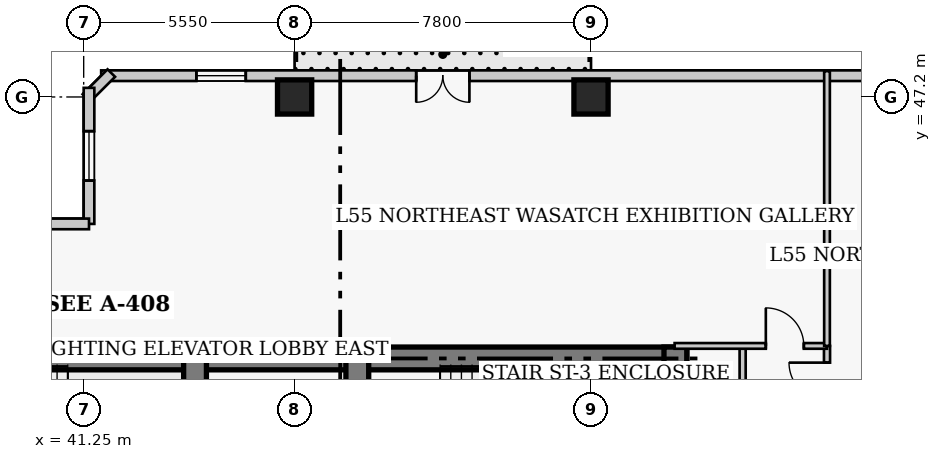
"""IFC4 building model, lengths in metres.
Left out: names, types, materials, properties, quantities, classifications, styles, units other than length and angle.
Written with IfcOpenShell. Run it as: python <this file> out.ifc"""

import sys

from ifc_helpers import new_model, si_unit, direction, frame, frame_2d, origin, origin_2d, place, context, subcontext, project, spatial, rectangle, extrude, element, fill, save


model = new_model("IFC4")
c1 = context("Model", 3, precision=1e-05, world=origin(), true_north=direction((0.0, 1.0)))
c2 = subcontext(c1, "Body", "Model", "MODEL_VIEW")
j1 = project(units=[si_unit("LENGTHUNIT", "METRE"), si_unit("PLANEANGLEUNIT", "RADIAN")], contexts=[c1])
p1 = place(None, origin())
s1 = spatial("IfcSite", under=j1, at=p1, CompositionType="ELEMENT")
p2 = place(p1, origin())
s2 = spatial("IfcBuilding", under=s1, at=p2, CompositionType="ELEMENT")
p3 = place(p2, frame((0.0, 0.0, 220.2)))
s3 = spatial("IfcBuildingStorey", under=s2, at=p3, CompositionType="ELEMENT", Elevation=220.2)
p4 = place(p3, frame((35.85, 40.32, 0.0), z_axis=(0.0, 0.0, 1.0), x_axis=(1.0, 0.0, 0.0)))
e1 = element("IfcWall", 1, at=p4, inside=s3, PredefinedType="SHEAR", context=c2, shape_type="SweptSolid", body=[
    extrude(rectangle(XDim=12.6, YDim=0.6, at=frame_2d((6.3, 0.0))), origin(), (0.0, 0.0, 1.0), 3.9),
])
p5 = place(p3, frame((48.45, 40.32, 0.0), z_axis=(0.0, 0.0, 1.0), x_axis=(1.0, 0.0, 0.0)))
e2 = element("IfcWall", 2, at=p5, inside=s3, PredefinedType="SHEAR", context=c2, shape_type="SweptSolid", body=[
    extrude(rectangle(XDim=8.67, YDim=0.6, at=frame_2d((4.335, 0.0))), origin(), (0.0, 0.0, 1.0), 3.9),
])
p6 = place(p3, frame((56.82, 27.05, 0.0), z_axis=(0.0, 0.0, 1.0), x_axis=(0.0, 1.0, 0.0)))
e3 = element("IfcWall", 3, at=p6, inside=s3, PredefinedType="SHEAR", context=c2, shape_type="SweptSolid", body=[
    extrude(rectangle(XDim=13.57, YDim=0.6, at=frame_2d((6.785, 0.0))), origin(), (0.0, 0.0, 1.0), 3.9),
])
p7 = place(p3, frame((44.18, 36.37, 0.0), z_axis=(0.0, 0.0, 1.0), x_axis=(0.0, 1.0, 0.0)))
e4 = element("IfcWall", 4, at=p7, inside=s3, PredefinedType="SHEAR", context=c2, shape_type="SweptSolid", body=[
    extrude(rectangle(XDim=3.95, YDim=0.6, at=frame_2d((1.975, 0.0))), origin(), (0.0, 0.0, 1.0), 3.9),
])
p8 = place(p3, frame((48.45, 32.45, 0.0), z_axis=(0.0, 0.0, 1.0), x_axis=(0.0, 1.0, 0.0)))
e5 = element("IfcWall", 5, at=p8, inside=s3, PredefinedType="SHEAR", context=c2, shape_type="SweptSolid", body=[
    extrude(rectangle(XDim=7.87, YDim=0.6, at=frame_2d((3.935, 0.0))), origin(), (0.0, 0.0, 1.0), 3.9),
])
p9 = place(p8, frame((5.75, 0.0, 0.0)))
e6 = element("IfcOpeningElement", 6, at=p9, cuts=e5, PredefinedType="OPENING", context=c2, shape_type="SweptSolid", body=[
    extrude(rectangle(XDim=1.1, YDim=2.15, at=frame_2d((0.55, 1.075))), frame((0.0, 0.31, 0.0), z_axis=(0.0, -1.0, 0.0), x_axis=(1.0, 0.0, 0.0)), (0.0, 0.0, 1.0), 0.62),
])
for number, where, z_axis, x_axis in (
    (7, (46.8, 47.2, 0.0), (0.0, 0.0, 1.0), (1.0, 0.0, 0.0)),
    (8, (54.6, 47.2, 0.0), (0.0, 0.0, 1.0), (1.0, 0.0, 0.0)),
):
    element("IfcColumn", number, at=place(p3, frame(where, z_axis=z_axis, x_axis=x_axis)), inside=s3, PredefinedType="COLUMN", context=c2, shape_type="SweptSolid", body=[
        extrude(rectangle(XDim=0.9, YDim=0.9, at=origin_2d()), origin(), (0.0, 0.0, 1.0), 3.9),
    ])
p10 = place(p3, frame((67.54, 47.76, 0.0), z_axis=(0.0, 0.0, 1.0), x_axis=(-1.0, 0.0, 0.0)))
e9 = element("IfcWall", 9, at=p10, inside=s3, PredefinedType="SOLIDWALL", context=c2, shape_type="SweptSolid", body=[
    extrude(rectangle(XDim=25.83, YDim=0.28, at=frame_2d((12.915, 0.0))), origin(), (0.0, 0.0, 1.0), 3.65),
])
p11 = place(p10, frame((16.14, 0.0, 0.0)))
e10 = element("IfcOpeningElement", 10, at=p11, cuts=e9, PredefinedType="OPENING", context=c2, shape_type="SweptSolid", body=[
    extrude(rectangle(XDim=1.4, YDim=2.15, at=frame_2d((0.7, 1.075))), frame((0.0, 0.15, 0.0), z_axis=(0.0, -1.0, 0.0), x_axis=(1.0, 0.0, 0.0)), (0.0, 0.0, 1.0), 0.3),
])
p12 = place(p10, frame((3.655, 0.0, 0.85)))
e11 = element("IfcOpeningElement", 11, at=p12, cuts=e9, PredefinedType="OPENING", context=c2, shape_type="SweptSolid", body=[
    extrude(rectangle(XDim=1.3, YDim=1.7, at=frame_2d((0.65, 0.85))), frame((0.0, 0.15, 0.0), z_axis=(0.0, -1.0, 0.0), x_axis=(1.0, 0.0, 0.0)), (0.0, 0.0, 1.0), 0.3),
])
p13 = place(p10, frame((22.025, 0.0, 0.85)))
e12 = element("IfcOpeningElement", 12, at=p13, cuts=e9, PredefinedType="OPENING", context=c2, shape_type="SweptSolid", body=[
    extrude(rectangle(XDim=1.3, YDim=1.7, at=frame_2d((0.65, 0.85))), frame((0.0, 0.15, 0.0), z_axis=(0.0, -1.0, 0.0), x_axis=(1.0, 0.0, 0.0)), (0.0, 0.0, 1.0), 0.3),
])
p14 = place(p3, frame((41.977, 47.829, 0.0), z_axis=(0.0, 0.0, 1.0), x_axis=(-0.706975312048, -0.707238225886, 0.0)))
e13 = element("IfcWall", 13, at=p14, inside=s3, PredefinedType="SOLIDWALL", context=c2, shape_type="SweptSolid", body=[
    extrude(rectangle(XDim=0.929, YDim=0.28, at=frame_2d((0.464, 0.0))), origin(), (0.0, 0.0, 1.0), 3.65),
])
p15 = place(p3, frame((41.39, 47.44, 0.0), z_axis=(0.0, 0.0, 1.0), x_axis=(0.0, -1.0, 0.0)))
e14 = element("IfcWall", 14, at=p15, inside=s3, PredefinedType="SOLIDWALL", context=c2, shape_type="SweptSolid", body=[
    extrude(rectangle(XDim=3.58, YDim=0.28, at=frame_2d((1.79, 0.0))), origin(), (0.0, 0.0, 1.0), 3.65),
])
p16 = place(p15, frame((1.14, 0.0, 0.85)))
e15 = element("IfcOpeningElement", 15, at=p16, cuts=e14, PredefinedType="OPENING", context=c2, shape_type="SweptSolid", body=[
    extrude(rectangle(XDim=1.3, YDim=1.7, at=frame_2d((0.65, 0.85))), frame((0.0, 0.15, 0.0), z_axis=(0.0, -1.0, 0.0), x_axis=(1.0, 0.0, 0.0)), (0.0, 0.0, 1.0), 0.3),
])
p17 = place(p3, frame((41.39, 43.86, 0.0), z_axis=(0.0, 0.0, 1.0), x_axis=(-1.0, 0.0, 0.0)))
e16 = element("IfcWall", 16, at=p17, inside=s3, PredefinedType="SOLIDWALL", context=c2, shape_type="SweptSolid", body=[
    extrude(rectangle(XDim=4.78, YDim=0.28, at=frame_2d((2.39, 0.0))), origin(), (0.0, 0.0, 1.0), 3.65),
])
p18 = place(p17, frame((1.74, 0.0, 0.85)))
e17 = element("IfcOpeningElement", 17, at=p18, cuts=e16, PredefinedType="OPENING", context=c2, shape_type="SweptSolid", body=[
    extrude(rectangle(XDim=1.3, YDim=1.7, at=frame_2d((0.65, 0.85))), frame((0.0, 0.15, 0.0), z_axis=(0.0, -1.0, 0.0), x_axis=(1.0, 0.0, 0.0)), (0.0, 0.0, 1.0), 0.3),
])
p19 = place(p3, frame((60.81, 11.95, 0.0), z_axis=(0.0, 0.0, 1.0), x_axis=(0.0, 1.0, 0.0)))
e18 = element("IfcWall", 18, at=p19, inside=s3, PredefinedType="PARTITIONING", context=c2, shape_type="SweptSolid", body=[
    extrude(rectangle(XDim=28.7, YDim=0.16, at=frame_2d((14.35, 0.0))), origin(), (0.0, 0.0, 1.0), 3.65),
])
p20 = place(p19, frame((3.55, 0.0, 0.0)))
e19 = element("IfcOpeningElement", 19, at=p20, cuts=e18, PredefinedType="OPENING", context=c2, shape_type="SweptSolid", body=[
    extrude(rectangle(XDim=0.95, YDim=2.1, at=frame_2d((0.475, 1.05))), frame((0.0, 0.09, 0.0), z_axis=(0.0, -1.0, 0.0), x_axis=(1.0, 0.0, 0.0)), (0.0, 0.0, 1.0), 0.18),
])
p21 = place(p19, frame((9.409, 0.0, 0.0)))
e20 = element("IfcOpeningElement", 20, at=p21, cuts=e18, PredefinedType="OPENING", context=c2, shape_type="SweptSolid", body=[
    extrude(rectangle(XDim=0.95, YDim=2.1, at=frame_2d((0.475, 1.05))), frame((0.0, 0.09, 0.0), z_axis=(0.0, -1.0, 0.0), x_axis=(1.0, 0.0, 0.0)), (0.0, 0.0, 1.0), 0.18),
])
p22 = place(p19, frame((27.26, 0.0, 0.0)))
e21 = element("IfcOpeningElement", 21, at=p22, cuts=e18, PredefinedType="OPENING", context=c2, shape_type="SweptSolid", body=[
    extrude(rectangle(XDim=1.0, YDim=2.15, at=frame_2d((0.5, 1.075))), frame((0.0, 0.09, 0.0), z_axis=(0.0, -1.0, 0.0), x_axis=(1.0, 0.0, 0.0)), (0.0, 0.0, 1.0), 0.18),
])
p23 = place(p3, frame((58.59, 16.86, 0.0), z_axis=(0.0, 0.0, 1.0), x_axis=(0.0, 1.0, 0.0)))
e22 = element("IfcWall", 22, at=p23, inside=s3, PredefinedType="PARTITIONING", context=c2, shape_type="SweptSolid", body=[
    extrude(rectangle(XDim=23.79, YDim=0.16, at=frame_2d((11.895, 0.0))), origin(), (0.0, 0.0, 1.0), 3.246),
])
p24 = place(p3, frame((56.8, 40.65, 0.0), z_axis=(0.0, 0.0, 1.0), x_axis=(1.0, 0.0, 0.0)))
e23 = element("IfcWall", 23, at=p24, inside=s3, PredefinedType="PARTITIONING", context=c2, shape_type="SweptSolid", body=[
    extrude(rectangle(XDim=4.01, YDim=0.15, at=frame_2d((2.005, 0.0))), origin(), (0.0, 0.0, 1.0), 3.65),
])
p25 = place(p24, frame((2.4, 0.0, 0.0)))
e24 = element("IfcOpeningElement", 24, at=p25, cuts=e23, PredefinedType="OPENING", context=c2, shape_type="SweptSolid", body=[
    extrude(rectangle(XDim=1.0, YDim=2.15, at=frame_2d((0.5, 1.075))), frame((0.0, 0.085, 0.0), z_axis=(0.0, -1.0, 0.0), x_axis=(1.0, 0.0, 0.0)), (0.0, 0.0, 1.0), 0.17),
])
p26 = place(p3, frame((60.81, 40.65, 0.0), z_axis=(0.0, 0.0, 1.0), x_axis=(0.0, 1.0, 0.0)))
e25 = element("IfcWall", 25, at=p26, inside=s3, PredefinedType="PARTITIONING", context=c2, shape_type="SweptSolid", body=[
    extrude(rectangle(XDim=7.23, YDim=0.15, at=frame_2d((3.615, 0.0))), origin(), (0.0, 0.0, 1.0), 3.65),
])
p27 = place(p11, origin())
e26 = element("IfcDoor", 26, at=p27, inside=s3, OperationType="DOUBLE_DOOR_SINGLE_SWING", PredefinedType="DOOR", context=c2, shape_type="SweptSolid", body=[
    extrude(rectangle(XDim=1.4, YDim=2.15, at=frame_2d((0.7, 1.075))), frame((0.0, 0.025, 0.0), z_axis=(0.0, -1.0, 0.0), x_axis=(1.0, 0.0, 0.0)), (0.0, 0.0, 1.0), 0.05),
])
fill(e10, e26)
p28 = place(p13, origin())
e27 = element("IfcWindow", 27, at=p28, inside=s3, PartitioningType="SINGLE_PANEL", PredefinedType="WINDOW", context=c2, shape_type="SweptSolid", body=[
    extrude(rectangle(XDim=1.3, YDim=1.7, at=frame_2d((0.65, 0.85))), frame((0.0, 0.03, 0.0), z_axis=(0.0, -1.0, 0.0), x_axis=(1.0, 0.0, 0.0)), (0.0, 0.0, 1.0), 0.06),
])
fill(e12, e27)
p29 = place(p16, origin())
e28 = element("IfcWindow", 28, at=p29, inside=s3, PartitioningType="SINGLE_PANEL", PredefinedType="WINDOW", context=c2, shape_type="SweptSolid", body=[
    extrude(rectangle(XDim=1.3, YDim=1.7, at=frame_2d((0.65, 0.85))), frame((0.0, 0.03, 0.0), z_axis=(0.0, -1.0, 0.0), x_axis=(1.0, 0.0, 0.0)), (0.0, 0.0, 1.0), 0.06),
])
fill(e15, e28)
p30 = place(p25, origin())
e29 = element("IfcDoor", 29, at=p30, inside=s3, OperationType="SINGLE_SWING_LEFT", PredefinedType="DOOR", context=c2, shape_type="SweptSolid", body=[
    extrude(rectangle(XDim=1.0, YDim=2.15, at=frame_2d((0.5, 1.075))), frame((0.0, 0.025, 0.0), z_axis=(0.0, -1.0, 0.0), x_axis=(1.0, 0.0, 0.0)), (0.0, 0.0, 1.0), 0.05),
])
fill(e24, e29)
p31 = place(p22, origin())
e30 = element("IfcDoor", 30, at=p31, inside=s3, OperationType="SINGLE_SWING_RIGHT", PredefinedType="DOOR", context=c2, shape_type="SweptSolid", body=[
    extrude(rectangle(XDim=1.0, YDim=2.15, at=frame_2d((0.5, 1.075))), frame((0.0, 0.025, 0.0), z_axis=(0.0, -1.0, 0.0), x_axis=(1.0, 0.0, 0.0)), (0.0, 0.0, 1.0), 0.05),
])
fill(e21, e30)
save(model, sys.argv[1])
